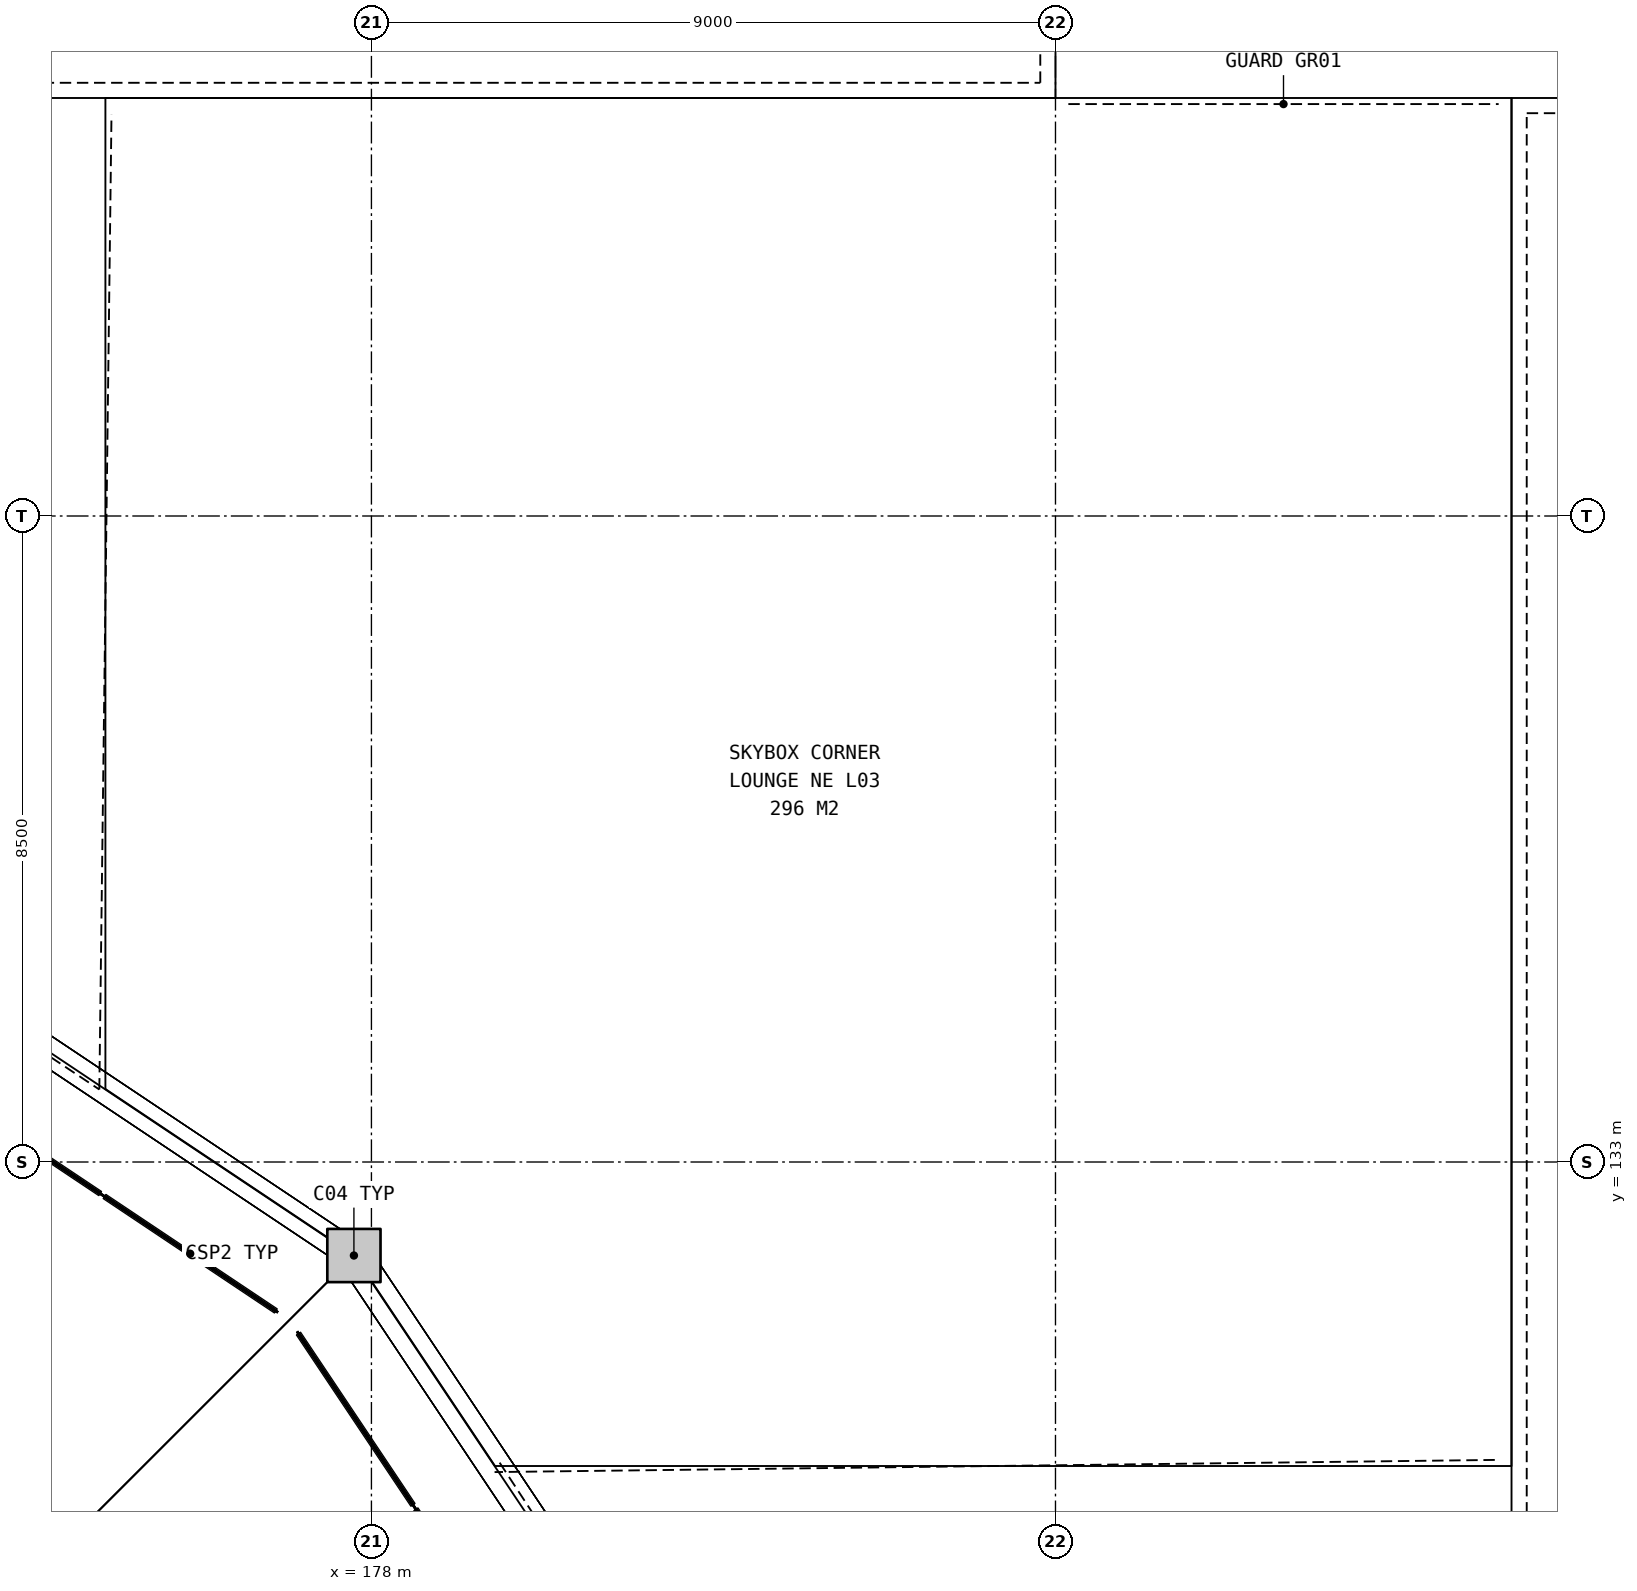
"""IFC4 building model, lengths in metres.
Left out: names, types, materials, properties, quantities, classifications, styles, units other than length and angle.
Written with IfcOpenShell. Run it as: python <this file> out.ifc"""

import sys

from ifc_helpers import new_model, si_unit, direction, frame, origin, origin_2d, place, context, subcontext, project, spatial, rectangle, extrude, element, save


model = new_model("IFC4")
c1 = context("Model", 3, precision=1e-05, world=origin(), true_north=direction((0.0, 1.0)))
c2 = subcontext(c1, "Body", "Model", "MODEL_VIEW")
j1 = project(units=[si_unit("LENGTHUNIT", "METRE"), si_unit("PLANEANGLEUNIT", "RADIAN")], contexts=[c1])
p1 = place(None, origin())
s1 = spatial("IfcSite", under=j1, at=p1, CompositionType="ELEMENT")
p2 = place(p1, origin())
s2 = spatial("IfcBuilding", under=s1, at=p2, CompositionType="ELEMENT")
p3 = place(p2, frame((0.0, 0.0, 16.2)))
s3 = spatial("IfcBuildingStorey", under=s2, at=p3, CompositionType="ELEMENT", Elevation=16.2)
p4 = place(p3, frame((177.77, 131.77, 0.0), z_axis=(0.0, 0.0, 1.0), x_axis=(1.0, 0.0, 0.0)))
e1 = element("IfcColumn", 1, at=p4, inside=s3, PredefinedType="COLUMN", context=c2, shape_type="SweptSolid", body=[
    extrude(rectangle(XDim=0.7, YDim=0.7, at=origin_2d()), origin(), (0.0, 0.0, 1.0), 5.4),
])
save(model, sys.argv[1])
